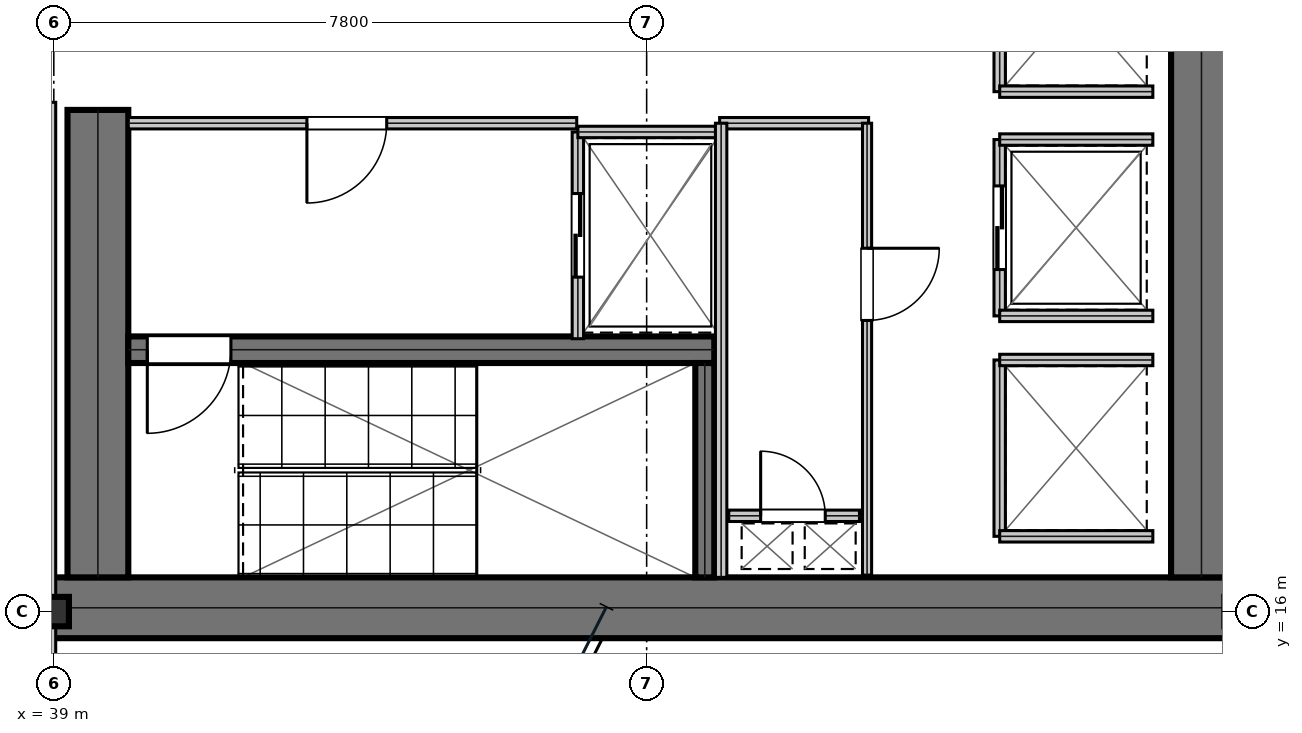
"""IFC4 building model, lengths in metres.
Left out: names, types, materials, properties, quantities, classifications, styles, units other than length and angle.
Written with IfcOpenShell. Run it as: python <this file> out.ifc"""

import sys

from ifc_helpers import new_model, si_unit, direction, frame, frame_2d, origin, origin_2d, place, context, subcontext, project, spatial, rectangle, i_section, extrude, element, fill, save


model = new_model("IFC4")
c1 = context("Model", 3, precision=1e-05, world=origin(), true_north=direction((0.0, 1.0)))
c2 = subcontext(c1, "Body", "Model", "MODEL_VIEW")
j1 = project(units=[si_unit("LENGTHUNIT", "METRE"), si_unit("PLANEANGLEUNIT", "RADIAN")], contexts=[c1])
p1 = place(None, origin())
s1 = spatial("IfcSite", under=j1, at=p1, CompositionType="ELEMENT")
p2 = place(p1, origin())
s2 = spatial("IfcBuilding", under=s1, at=p2, CompositionType="ELEMENT")
p3 = place(p2, frame((0.0, 0.0, 133.05)))
s3 = spatial("IfcBuildingStorey", under=s2, at=p3, CompositionType="ELEMENT", Elevation=133.05)
p4 = place(p3, frame((38.8, 16.05, 0.0), z_axis=(0.0, 0.0, 1.0), x_axis=(1.0, 0.0, 0.0)))
e1 = element("IfcWall", 1, at=p4, inside=s3, PredefinedType="SHEAR", context=c2, shape_type="SweptSolid", body=[
    extrude(rectangle(XDim=16.0, YDim=0.8, at=frame_2d((8.0, 0.0))), origin(), (0.0, 0.0, 1.0), 3.81),
])
p5 = place(p3, frame((39.58, 16.45, 0.0), z_axis=(0.0, 0.0, 1.0), x_axis=(0.0, 1.0, 0.0)))
e2 = element("IfcWall", 2, at=p5, inside=s3, PredefinedType="SHEAR", context=c2, shape_type="SweptSolid", body=[
    extrude(rectangle(XDim=6.15, YDim=0.8, at=frame_2d((3.075, 0.0))), origin(), (0.0, 0.0, 1.0), 3.81),
])
p6 = place(p3, frame((54.1, 16.45, 0.0), z_axis=(0.0, 0.0, 1.0), x_axis=(0.0, 1.0, 0.0)))
e3 = element("IfcWall", 3, at=p6, inside=s3, PredefinedType="SHEAR", context=c2, shape_type="SweptSolid", body=[
    extrude(rectangle(XDim=15.1, YDim=0.8, at=frame_2d((7.55, 0.0))), origin(), (0.0, 0.0, 1.0), 3.81),
])
p7 = place(p3, frame((39.98, 19.445, 0.0), z_axis=(0.0, 0.0, 1.0), x_axis=(1.0, 0.0, 0.0)))
e4 = element("IfcWall", 4, at=p7, inside=s3, PredefinedType="SHEAR", context=c2, shape_type="SweptSolid", body=[
    extrude(rectangle(XDim=7.71, YDim=0.35, at=frame_2d((3.855, 0.0))), origin(), (0.0, 0.0, 1.0), 3.81),
])
p8 = place(p7, frame((0.25, 0.0, 0.0)))
e5 = element("IfcOpeningElement", 5, at=p8, cuts=e4, PredefinedType="OPENING", context=c2, shape_type="SweptSolid", body=[
    extrude(rectangle(XDim=1.1, YDim=2.15, at=frame_2d((0.55, 1.075))), frame((0.0, 0.185, 0.0), z_axis=(0.0, -1.0, 0.0), x_axis=(1.0, 0.0, 0.0)), (0.0, 0.0, 1.0), 0.37),
])
p9 = place(p3, frame((47.565, 16.45, 0.0), z_axis=(0.0, 0.0, 1.0), x_axis=(0.0, 1.0, 0.0)))
e6 = element("IfcWall", 6, at=p9, inside=s3, PredefinedType="SHEAR", context=c2, shape_type="SweptSolid", body=[
    extrude(rectangle(XDim=2.82, YDim=0.25, at=frame_2d((1.41, 0.0))), origin(), (0.0, 0.0, 1.0), 3.81),
])
p10 = place(p3, frame((39.0, 16.0, 0.0), z_axis=(0.0, 0.0, 1.0), x_axis=(1.0, 0.0, 0.0)))
e7 = element("IfcColumn", 7, at=p10, inside=s3, PredefinedType="COLUMN", context=c2, shape_type="SweptSolid", body=[
    extrude(i_section(OverallWidth=0.398, OverallDepth=0.387, WebThickness=0.021, FlangeThickness=0.033, at=origin_2d()), origin(), (0.0, 0.0, 1.0), 4.044),
])
p11 = place(p3, frame((39.98, 22.425, 0.0), z_axis=(0.0, 0.0, 1.0), x_axis=(1.0, 0.0, 0.0)))
e8 = element("IfcWall", 8, at=p11, inside=s3, PredefinedType="PARTITIONING", context=c2, shape_type="SweptSolid", body=[
    extrude(rectangle(XDim=5.9, YDim=0.15, at=frame_2d((2.95, 0.0))), origin(), (0.0, 0.0, 1.0), 3.81),
])
p12 = place(p11, frame((2.35, 0.0, 0.0)))
e9 = element("IfcOpeningElement", 9, at=p12, cuts=e8, PredefinedType="OPENING", context=c2, shape_type="SweptSolid", body=[
    extrude(rectangle(XDim=1.05, YDim=2.15, at=frame_2d((0.525, 1.075))), frame((0.0, 0.085, 0.0), z_axis=(0.0, -1.0, 0.0), x_axis=(1.0, 0.0, 0.0)), (0.0, 0.0, 1.0), 0.17),
])
p13 = place(p3, frame((45.895, 19.59, 0.0), z_axis=(0.0, 0.0, 1.0), x_axis=(0.0, 1.0, 0.0)))
e10 = element("IfcWall", 10, at=p13, inside=s3, PredefinedType="PARTITIONING", context=c2, shape_type="SweptSolid", body=[
    extrude(rectangle(XDim=2.72, YDim=0.15, at=frame_2d((1.36, 0.0))), origin(), (0.0, 0.0, 1.0), 3.81),
])
p14 = place(p13, frame((0.81, 0.0, 0.0)))
e11 = element("IfcOpeningElement", 11, at=p14, cuts=e10, PredefinedType="OPENING", context=c2, shape_type="SweptSolid", body=[
    extrude(rectangle(XDim=1.1, YDim=2.15, at=frame_2d((0.55, 1.075))), frame((0.0, 0.085, 0.0), z_axis=(0.0, -1.0, 0.0), x_axis=(1.0, 0.0, 0.0)), (0.0, 0.0, 1.0), 0.17),
])
p15 = place(p3, frame((45.895, 22.31, 0.0), z_axis=(0.0, 0.0, 1.0), x_axis=(1.0, 0.0, 0.0)))
e12 = element("IfcWall", 12, at=p15, inside=s3, PredefinedType="PARTITIONING", context=c2, shape_type="SweptSolid", body=[
    extrude(rectangle(XDim=1.915, YDim=0.15, at=frame_2d((0.958, 0.0))), origin(), (0.0, 0.0, 1.0), 3.81),
])
p16 = place(p3, frame((51.445, 19.89, 0.0), z_axis=(0.0, 0.0, 1.0), x_axis=(0.0, 1.0, 0.0)))
e13 = element("IfcWall", 13, at=p16, inside=s3, PredefinedType="PARTITIONING", context=c2, shape_type="SweptSolid", body=[
    extrude(rectangle(XDim=2.32, YDim=0.15, at=frame_2d((1.16, 0.0))), origin(), (0.0, 0.0, 1.0), 3.81),
])
p17 = place(p16, frame((0.61, 0.0, 0.0)))
e14 = element("IfcOpeningElement", 14, at=p17, cuts=e13, PredefinedType="OPENING", context=c2, shape_type="SweptSolid", body=[
    extrude(rectangle(XDim=1.1, YDim=2.15, at=frame_2d((0.55, 1.075))), frame((0.0, 0.085, 0.0), z_axis=(0.0, -1.0, 0.0), x_axis=(1.0, 0.0, 0.0)), (0.0, 0.0, 1.0), 0.17),
])
for number, where, z_axis, x_axis in (
    (15, (51.445, 19.89, 0.0), (0.0, 0.0, 1.0), (1.0, 0.0, 0.0)),
    (16, (51.445, 22.21, 0.0), (0.0, 0.0, 1.0), (1.0, 0.0, 0.0)),
):
    element("IfcWall", number, at=place(p3, frame(where, z_axis=z_axis, x_axis=x_axis)), inside=s3, PredefinedType="PARTITIONING", context=c2, shape_type="SweptSolid", body=[
        extrude(rectangle(XDim=2.015, YDim=0.15, at=frame_2d((1.007, 0.0))), origin(), (0.0, 0.0, 1.0), 3.81),
    ])
p18 = place(p3, frame((51.445, 22.84, 0.0), z_axis=(0.0, 0.0, 1.0), x_axis=(0.0, 1.0, 0.0)))
e17 = element("IfcWall", 17, at=p18, inside=s3, PredefinedType="PARTITIONING", context=c2, shape_type="SweptSolid", body=[
    extrude(rectangle(XDim=2.32, YDim=0.15, at=frame_2d((1.16, 0.0))), origin(), (0.0, 0.0, 1.0), 3.81),
])
p19 = place(p3, frame((51.445, 22.84, 0.0), z_axis=(0.0, 0.0, 1.0), x_axis=(1.0, 0.0, 0.0)))
e18 = element("IfcWall", 18, at=p19, inside=s3, PredefinedType="PARTITIONING", context=c2, shape_type="SweptSolid", body=[
    extrude(rectangle(XDim=2.015, YDim=0.15, at=frame_2d((1.007, 0.0))), origin(), (0.0, 0.0, 1.0), 3.81),
])
p20 = place(p3, frame((51.445, 16.99, 0.0), z_axis=(0.0, 0.0, 1.0), x_axis=(0.0, 1.0, 0.0)))
e19 = element("IfcWall", 19, at=p20, inside=s3, PredefinedType="PARTITIONING", context=c2, shape_type="SweptSolid", body=[
    extrude(rectangle(XDim=2.32, YDim=0.15, at=frame_2d((1.16, 0.0))), origin(), (0.0, 0.0, 1.0), 3.81),
])
for number, where, z_axis, x_axis in (
    (20, (51.445, 16.99, 0.0), (0.0, 0.0, 1.0), (1.0, 0.0, 0.0)),
    (21, (51.445, 19.31, 0.0), (0.0, 0.0, 1.0), (1.0, 0.0, 0.0)),
):
    element("IfcWall", number, at=place(p3, frame(where, z_axis=z_axis, x_axis=x_axis)), inside=s3, PredefinedType="PARTITIONING", context=c2, shape_type="SweptSolid", body=[
        extrude(rectangle(XDim=2.015, YDim=0.15, at=frame_2d((1.007, 0.0))), origin(), (0.0, 0.0, 1.0), 3.81),
    ])
p21 = place(p3, frame((47.88, 17.26, 0.0), z_axis=(0.0, 0.0, 1.0), x_axis=(1.0, 0.0, 0.0)))
e22 = element("IfcWall", 22, at=p21, inside=s3, PredefinedType="PARTITIONING", context=c2, shape_type="SweptSolid", body=[
    extrude(rectangle(XDim=1.72, YDim=0.15, at=frame_2d((0.86, 0.0))), origin(), (0.0, 0.0, 1.0), 3.81),
])
p22 = place(p21, frame((0.42, 0.0, 0.0)))
e23 = element("IfcOpeningElement", 23, at=p22, cuts=e22, PredefinedType="OPENING", context=c2, shape_type="SweptSolid", body=[
    extrude(rectangle(XDim=0.85, YDim=2.15, at=frame_2d((0.425, 1.075))), frame((0.0, 0.085, 0.0), z_axis=(0.0, -1.0, 0.0), x_axis=(1.0, 0.0, 0.0)), (0.0, 0.0, 1.0), 0.17),
])
p23 = place(p3, frame((47.76, 22.425, 0.0), z_axis=(0.0, 0.0, 1.0), x_axis=(1.0, 0.0, 0.0)))
e24 = element("IfcWall", 24, at=p23, inside=s3, PredefinedType="PARTITIONING", context=c2, shape_type="SweptSolid", body=[
    extrude(rectangle(XDim=1.96, YDim=0.15, at=frame_2d((0.98, 0.0))), origin(), (0.0, 0.0, 1.0), 3.81),
])
p24 = place(p3, frame((47.78, 16.45, 0.0), z_axis=(0.0, 0.0, 1.0), x_axis=(0.0, 1.0, 0.0)))
e25 = element("IfcWall", 25, at=p24, inside=s3, PredefinedType="PARTITIONING", context=c2, shape_type="SweptSolid", body=[
    extrude(rectangle(XDim=5.975, YDim=0.15, at=frame_2d((2.988, 0.0))), origin(), (0.0, 0.0, 1.0), 3.81),
])
p25 = place(p3, frame((49.7, 16.48, 0.0), z_axis=(0.0, 0.0, 1.0), x_axis=(0.0, 1.0, 0.0)))
e26 = element("IfcWall", 26, at=p25, inside=s3, PredefinedType="PARTITIONING", context=c2, shape_type="SweptSolid", body=[
    extrude(rectangle(XDim=5.945, YDim=0.12, at=frame_2d((2.973, 0.0))), origin(), (0.0, 0.0, 1.0), 3.81),
])
p26 = place(p25, frame((3.35, 0.0, 0.0)))
e27 = element("IfcOpeningElement", 27, at=p26, cuts=e26, PredefinedType="OPENING", context=c2, shape_type="SweptSolid", body=[
    extrude(rectangle(XDim=0.95, YDim=2.15, at=frame_2d((0.475, 1.075))), frame((0.0, 0.07, 0.0), z_axis=(0.0, -1.0, 0.0), x_axis=(1.0, 0.0, 0.0)), (0.0, 0.0, 1.0), 0.14),
])
p27 = place(p3, frame((38.95, 14.5, 0.0), z_axis=(0.0, 0.0, 1.0), x_axis=(0.0, 1.0, 0.0)))
e28 = element("IfcWall", 28, at=p27, inside=s3, PredefinedType="PARTITIONING", context=c2, shape_type="SweptSolid", body=[
    extrude(rectangle(XDim=8.2, YDim=0.15, at=frame_2d((4.1, 0.0))), origin(), (0.0, 0.0, 1.0), 3.19),
])
p28 = place(p12, frame((1.05, 0.0, 0.0), z_axis=(0.0, 0.0, 1.0), x_axis=(-1.0, 0.0, 0.0)))
e29 = element("IfcDoor", 29, at=p28, inside=s3, OperationType="SINGLE_SWING_RIGHT", PredefinedType="DOOR", context=c2, shape_type="SweptSolid", body=[
    extrude(rectangle(XDim=1.05, YDim=2.15, at=frame_2d((0.525, 1.075))), frame((0.0, 0.025, 0.0), z_axis=(0.0, -1.0, 0.0), x_axis=(1.0, 0.0, 0.0)), (0.0, 0.0, 1.0), 0.05),
])
fill(e9, e29)
p29 = place(p14, frame((1.1, 0.0, 0.0), z_axis=(0.0, 0.0, 1.0), x_axis=(-1.0, 0.0, 0.0)))
e30 = element("IfcDoor", 30, at=p29, inside=s3, OperationType="DOUBLE_DOOR_SLIDING", PredefinedType="DOOR", context=c2, shape_type="SweptSolid", body=[
    extrude(rectangle(XDim=1.1, YDim=2.15, at=frame_2d((0.55, 1.075))), frame((0.0, 0.025, 0.0), z_axis=(0.0, -1.0, 0.0), x_axis=(1.0, 0.0, 0.0)), (0.0, 0.0, 1.0), 0.05),
])
fill(e11, e30)
p30 = place(p17, frame((1.1, 0.0, 0.0), z_axis=(0.0, 0.0, 1.0), x_axis=(-1.0, 0.0, 0.0)))
e31 = element("IfcDoor", 31, at=p30, inside=s3, OperationType="DOUBLE_DOOR_SLIDING", PredefinedType="DOOR", context=c2, shape_type="SweptSolid", body=[
    extrude(rectangle(XDim=1.1, YDim=2.15, at=frame_2d((0.55, 1.075))), frame((0.0, 0.025, 0.0), z_axis=(0.0, -1.0, 0.0), x_axis=(1.0, 0.0, 0.0)), (0.0, 0.0, 1.0), 0.05),
])
fill(e14, e31)
p31 = place(p22, origin())
e32 = element("IfcDoor", 32, at=p31, inside=s3, OperationType="SINGLE_SWING_LEFT", PredefinedType="TRAPDOOR", context=c2, shape_type="SweptSolid", body=[
    extrude(rectangle(XDim=0.85, YDim=2.15, at=frame_2d((0.425, 1.075))), frame((0.0, 0.025, 0.0), z_axis=(0.0, -1.0, 0.0), x_axis=(1.0, 0.0, 0.0)), (0.0, 0.0, 1.0), 0.05),
])
fill(e23, e32)
p32 = place(p26, frame((0.95, 0.0, 0.0), z_axis=(0.0, 0.0, 1.0), x_axis=(-1.0, 0.0, 0.0)))
e33 = element("IfcDoor", 33, at=p32, inside=s3, OperationType="SINGLE_SWING_LEFT", PredefinedType="DOOR", context=c2, shape_type="SweptSolid", body=[
    extrude(rectangle(XDim=0.95, YDim=2.15, at=frame_2d((0.475, 1.075))), frame((0.0, 0.025, 0.0), z_axis=(0.0, -1.0, 0.0), x_axis=(1.0, 0.0, 0.0)), (0.0, 0.0, 1.0), 0.05),
])
fill(e27, e33)
p33 = place(p8, frame((1.1, 0.0, 0.0), z_axis=(0.0, 0.0, 1.0), x_axis=(-1.0, 0.0, 0.0)))
e34 = element("IfcDoor", 34, at=p33, inside=s3, OperationType="SINGLE_SWING_RIGHT", PredefinedType="DOOR", context=c2, shape_type="SweptSolid", body=[
    extrude(rectangle(XDim=1.1, YDim=2.15, at=frame_2d((0.55, 1.075))), frame((0.0, 0.025, 0.0), z_axis=(0.0, -1.0, 0.0), x_axis=(1.0, 0.0, 0.0)), (0.0, 0.0, 1.0), 0.05),
])
fill(e5, e34)
save(model, sys.argv[1])
